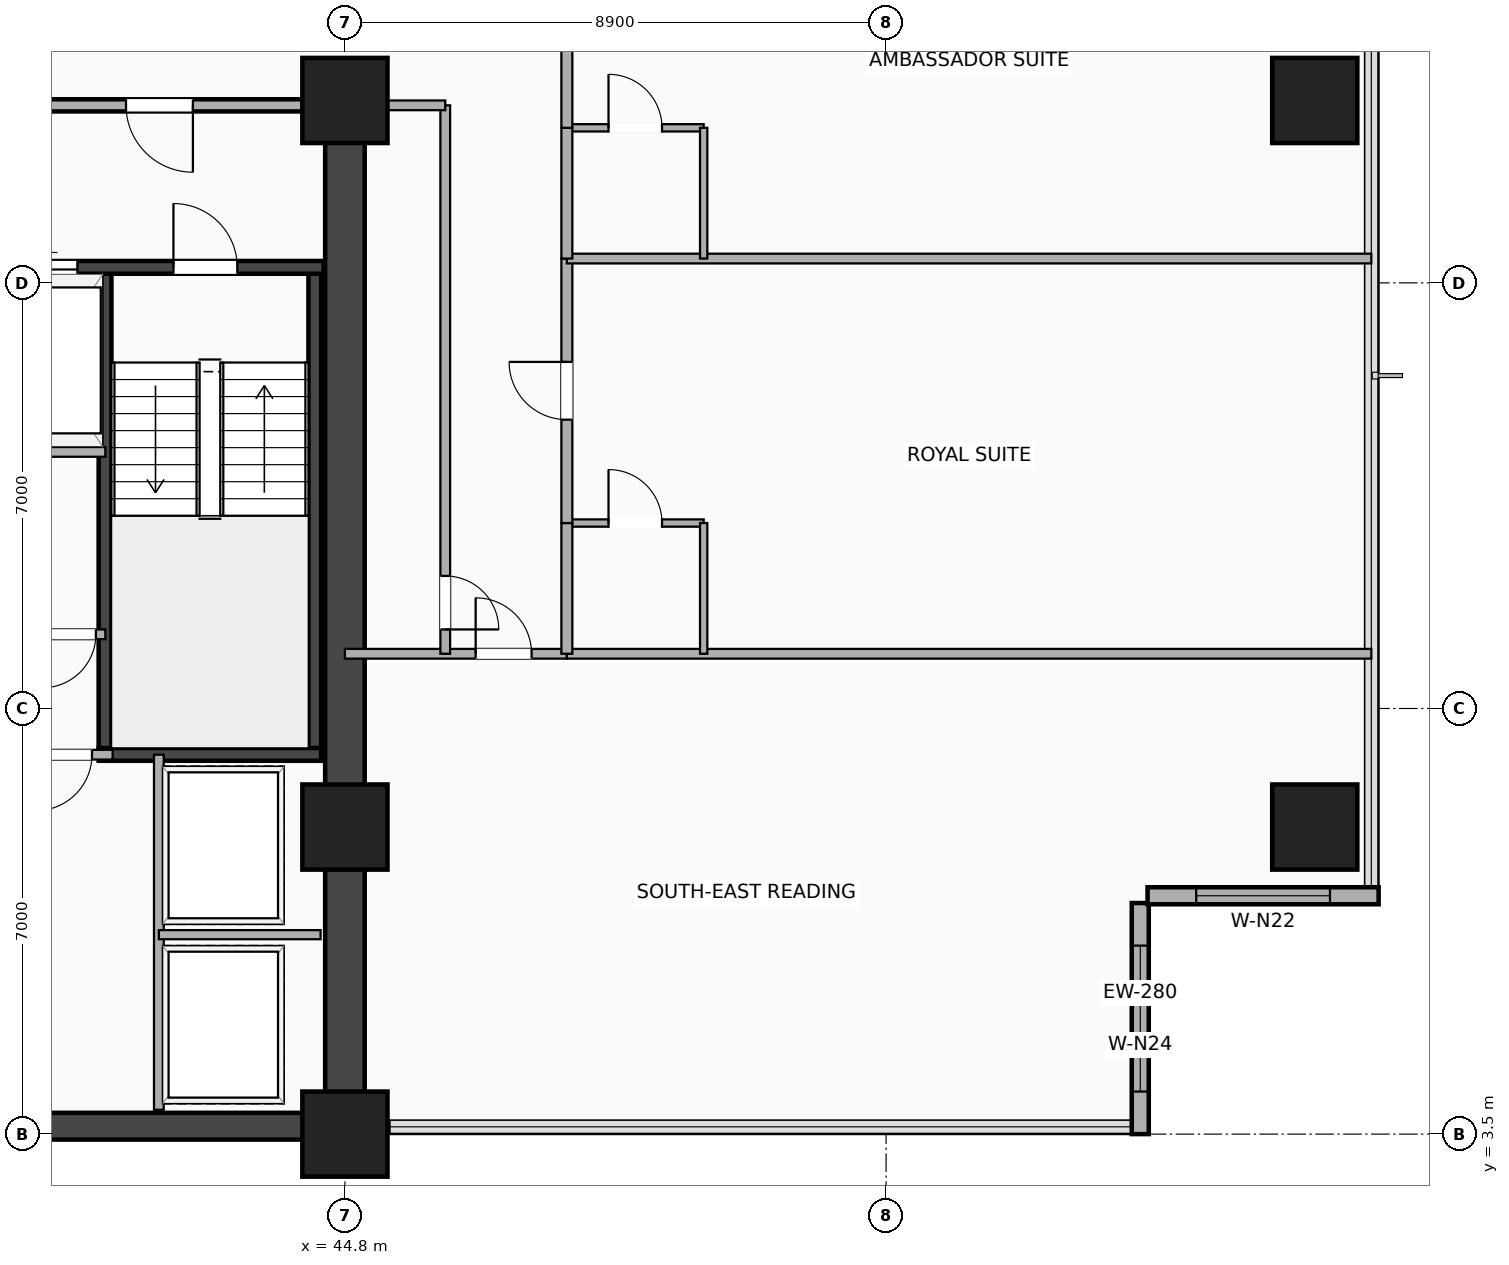
"""IFC4 building model, lengths in metres.
Left out: names, types, materials, properties, quantities, classifications, styles, units other than length and angle.
Written with IfcOpenShell. Run it as: python <this file> out.ifc"""

import sys

from ifc_helpers import new_model, si_unit, direction, frame, frame_2d, origin, origin_2d, place, context, subcontext, project, spatial, rectangle, extrude, element, fill, save


model = new_model("IFC4")
c1 = context("Model", 3, precision=1e-05, world=origin(), true_north=direction((0.0, 1.0)))
c2 = subcontext(c1, "Body", "Model", "MODEL_VIEW")
j1 = project(units=[si_unit("LENGTHUNIT", "METRE"), si_unit("PLANEANGLEUNIT", "RADIAN")], contexts=[c1])
p1 = place(None, origin())
s1 = spatial("IfcSite", under=j1, at=p1, CompositionType="ELEMENT")
p2 = place(p1, origin())
s2 = spatial("IfcBuilding", under=s1, at=p2, CompositionType="ELEMENT")
p3 = place(p2, frame((0.0, 0.0, 50.9)))
s3 = spatial("IfcBuildingStorey", under=s2, at=p3, CompositionType="ELEMENT", Elevation=50.9)
p4 = place(p3, frame((20.3, 3.63, 0.0), z_axis=(0.0, 0.0, 1.0), x_axis=(1.0, 0.0, 0.0)))
e1 = element("IfcWall", 1, at=p4, inside=s3, PredefinedType="SHEAR", context=c2, shape_type="SweptSolid", body=[
    extrude(rectangle(XDim=24.5, YDim=0.44, at=frame_2d((12.25, 0.0))), origin(), (0.0, 0.0, 1.0), 3.22),
])
p5 = place(p3, frame((44.8, 3.5, 0.0), z_axis=(0.0, 0.0, 1.0), x_axis=(0.0, 1.0, 0.0)))
e2 = element("IfcWall", 2, at=p5, inside=s3, PredefinedType="SHEAR", context=c2, shape_type="SweptSolid", body=[
    extrude(rectangle(XDim=16.9, YDim=0.65, at=frame_2d((8.45, 0.0))), origin(), (0.0, 0.0, 1.0), 3.22),
])
for number, where, z_axis, x_axis in (
    (3, (40.855, 9.745, 0.0), (0.0, 0.0, 1.0), (0.0, 1.0, 0.0)),
    (4, (44.305, 9.745, 0.0), (0.0, 0.0, 1.0), (0.0, 1.0, 0.0)),
):
    element("IfcWall", number, at=place(p3, frame(where, z_axis=z_axis, x_axis=x_axis)), inside=s3, PredefinedType="SHEAR", context=c2, shape_type="SweptSolid", body=[
        extrude(rectangle(XDim=8.01, YDim=0.21, at=frame_2d((4.005, 0.0))), origin(), (0.0, 0.0, 1.0), 3.22),
    ])
p6 = place(p3, frame((40.75, 9.745, 0.0), z_axis=(0.0, 0.0, 1.0), x_axis=(1.0, 0.0, 0.0)))
e5 = element("IfcWall", 5, at=p6, inside=s3, PredefinedType="SHEAR", context=c2, shape_type="SweptSolid", body=[
    extrude(rectangle(XDim=3.66, YDim=0.21, at=frame_2d((1.83, 0.0))), origin(), (0.0, 0.0, 1.0), 3.22),
])
p7 = place(p3, frame((37.25, 17.755, 0.0), z_axis=(0.0, 0.0, 1.0), x_axis=(1.0, 0.0, 0.0)))
e6 = element("IfcWall", 6, at=p7, inside=s3, PredefinedType="SHEAR", context=c2, shape_type="SweptSolid", body=[
    extrude(rectangle(XDim=7.2, YDim=0.21, at=frame_2d((3.6, 0.0))), origin(), (0.0, 0.0, 1.0), 3.22),
])
p8 = place(p7, frame((0.25, 0.0, 0.0)))
e7 = element("IfcOpeningElement", 7, at=p8, cuts=e6, PredefinedType="OPENING", context=c2, shape_type="SweptSolid", body=[
    extrude(rectangle(XDim=1.12, YDim=2.2, at=frame_2d((0.56, 1.1))), frame((0.0, 0.115, 0.0), z_axis=(0.0, -1.0, 0.0), x_axis=(1.0, 0.0, 0.0)), (0.0, 0.0, 1.0), 0.23),
])
p9 = place(p7, frame((2.05, 0.0, 0.0)))
e8 = element("IfcOpeningElement", 8, at=p9, cuts=e6, PredefinedType="OPENING", context=c2, shape_type="SweptSolid", body=[
    extrude(rectangle(XDim=1.1, YDim=2.18, at=frame_2d((0.55, 1.09))), frame((0.0, 0.115, 0.0), z_axis=(0.0, -1.0, 0.0), x_axis=(1.0, 0.0, 0.0)), (0.0, 0.0, 1.0), 0.23),
])
p10 = place(p7, frame((5.78, 0.0, 0.0), z_axis=(0.0, 0.0, 1.0), x_axis=(-1.0, 0.0, 0.0)))
e9 = element("IfcOpeningElement", 9, at=p10, cuts=e6, PredefinedType="OPENING", context=c2, shape_type="SweptSolid", body=[
    extrude(rectangle(XDim=1.05, YDim=2.15, at=frame_2d((0.525, 1.075))), frame((0.0, 0.115, 0.0), z_axis=(0.0, -1.0, 0.0), x_axis=(1.0, 0.0, 0.0)), (0.0, 0.0, 1.0), 0.23),
])
for number, where, z_axis, x_axis in (
    (10, (44.8, 3.5, -0.28), (0.0, 0.0, 1.0), (1.0, 0.0, 0.0)),
    (11, (44.8, 8.55, -0.28), (0.0, 0.0, 1.0), (1.0, 0.0, 0.0)),
    (12, (44.8, 20.5, -0.28), (0.0, 0.0, 1.0), (1.0, 0.0, 0.0)),
    (13, (60.75, 8.55, -0.28), (0.0, 0.0, 1.0), (1.0, 0.0, 0.0)),
    (14, (60.75, 20.5, -0.28), (0.0, 0.0, 1.0), (1.0, 0.0, 0.0)),
):
    element("IfcColumn", number, at=place(p3, frame(where, z_axis=z_axis, x_axis=x_axis)), inside=s3, PredefinedType="COLUMN", context=c2, shape_type="SweptSolid", body=[
        extrude(rectangle(XDim=1.4, YDim=1.4, at=origin_2d()), origin(), (0.0, 0.0, 1.0), 3.5),
    ])
p11 = place(p3, frame((57.88, 3.5, 0.0), z_axis=(0.0, 0.0, 1.0), x_axis=(0.0, 1.0, 0.0)))
e15 = element("IfcWall", 15, at=p11, inside=s3, PredefinedType="SOLIDWALL", context=c2, shape_type="SweptSolid", body=[
    extrude(rectangle(XDim=3.8, YDim=0.28, at=frame_2d((1.9, 0.0))), origin(), (0.0, 0.0, 1.0), 3.22),
])
p12 = place(p11, frame((0.7, 0.0, 0.85)))
e16 = element("IfcOpeningElement", 16, at=p12, cuts=e15, PredefinedType="OPENING", context=c2, shape_type="SweptSolid", body=[
    extrude(rectangle(XDim=2.4, YDim=1.65, at=frame_2d((1.2, 0.825))), frame((0.0, 0.15, 0.0), z_axis=(0.0, -1.0, 0.0), x_axis=(1.0, 0.0, 0.0)), (0.0, 0.0, 1.0), 0.3),
])
p13 = place(p3, frame((58.0, 7.42, 0.0), z_axis=(0.0, 0.0, 1.0), x_axis=(1.0, 0.0, 0.0)))
e17 = element("IfcWall", 17, at=p13, inside=s3, PredefinedType="SOLIDWALL", context=c2, shape_type="SweptSolid", body=[
    extrude(rectangle(XDim=3.8, YDim=0.28, at=frame_2d((1.9, 0.0))), origin(), (0.0, 0.0, 1.0), 3.22),
])
p14 = place(p13, frame((0.8, 0.0, 0.85)))
e18 = element("IfcOpeningElement", 18, at=p14, cuts=e17, PredefinedType="OPENING", context=c2, shape_type="SweptSolid", body=[
    extrude(rectangle(XDim=2.2, YDim=1.65, at=frame_2d((1.1, 0.825))), frame((0.0, 0.15, 0.0), z_axis=(0.0, -1.0, 0.0), x_axis=(1.0, 0.0, 0.0)), (0.0, 0.0, 1.0), 0.3),
])
p15 = place(p3, frame((37.25, 14.72, 0.0), z_axis=(0.0, 0.0, 1.0), x_axis=(1.0, 0.0, 0.0)))
e19 = element("IfcWall", 19, at=p15, inside=s3, PredefinedType="PARTITIONING", context=c2, shape_type="SweptSolid", body=[
    extrude(rectangle(XDim=3.61, YDim=0.16, at=frame_2d((1.805, 0.0))), origin(), (0.0, 0.0, 1.0), 3.22),
])
p16 = place(p3, frame((37.0, 20.42, 0.0), z_axis=(0.0, 0.0, 1.0), x_axis=(1.0, 0.0, 0.0)))
e20 = element("IfcWall", 20, at=p16, inside=s3, PredefinedType="PARTITIONING", context=c2, shape_type="SweptSolid", body=[
    extrude(rectangle(XDim=7.45, YDim=0.2, at=frame_2d((3.725, 0.0))), origin(), (0.0, 0.0, 1.0), 2.51),
])
p17 = place(p16, frame((4.2, 0.0, 0.0)))
e21 = element("IfcOpeningElement", 21, at=p17, cuts=e20, PredefinedType="OPENING", context=c2, shape_type="SweptSolid", body=[
    extrude(rectangle(XDim=1.1, YDim=2.15, at=frame_2d((0.55, 1.075))), frame((0.0, 0.11, 0.0), z_axis=(0.0, -1.0, 0.0), x_axis=(1.0, 0.0, 0.0)), (0.0, 0.0, 1.0), 0.22),
])
p18 = place(p3, frame((39.669, 11.72, 0.0), z_axis=(0.0, 0.0, 1.0), x_axis=(1.0, 0.0, 0.0)))
e22 = element("IfcWall", 22, at=p18, inside=s3, PredefinedType="PARTITIONING", context=c2, shape_type="SweptSolid", body=[
    extrude(rectangle(XDim=1.191, YDim=0.16, at=frame_2d((0.596, 0.0))), origin(), (0.0, 0.0, 1.0), 3.22),
])
p19 = place(p18, frame((0.156, 0.0, 0.0)))
e23 = element("IfcOpeningElement", 23, at=p19, cuts=e22, PredefinedType="OPENING", context=c2, shape_type="SweptSolid", body=[
    extrude(rectangle(XDim=0.88, YDim=2.08, at=frame_2d((0.44, 1.04))), frame((0.0, 0.09, 0.0), z_axis=(0.0, -1.0, 0.0), x_axis=(1.0, 0.0, 0.0)), (0.0, 0.0, 1.0), 0.18),
])
p20 = place(p3, frame((41.74, 3.9, 0.0), z_axis=(0.0, 0.0, 1.0), x_axis=(0.0, 1.0, 0.0)))
e24 = element("IfcWall", 24, at=p20, inside=s3, PredefinedType="PARTITIONING", context=c2, shape_type="SweptSolid", body=[
    extrude(rectangle(XDim=5.84, YDim=0.16, at=frame_2d((2.92, 0.0))), origin(), (0.0, 0.0, 1.0), 3.22),
])
p21 = place(p3, frame((41.74, 6.78, 0.0), z_axis=(0.0, 0.0, 1.0), x_axis=(1.0, 0.0, 0.0)))
e25 = element("IfcWall", 25, at=p21, inside=s3, PredefinedType="PARTITIONING", context=c2, shape_type="SweptSolid", body=[
    extrude(rectangle(XDim=2.66, YDim=0.15, at=frame_2d((1.33, 0.0))), origin(), (0.0, 0.0, 1.0), 2.51),
])
p22 = place(p3, frame((39.42, 9.74, 0.0), z_axis=(0.0, 0.0, 1.0), x_axis=(1.0, 0.0, 0.0)))
e26 = element("IfcWall", 26, at=p22, inside=s3, PredefinedType="PARTITIONING", context=c2, shape_type="SweptSolid", body=[
    extrude(rectangle(XDim=1.56, YDim=0.16, at=frame_2d((0.78, 0.0))), origin(), (0.0, 0.0, 1.0), 3.22),
])
p23 = place(p22, frame((0.3, 0.0, 0.0)))
e27 = element("IfcOpeningElement", 27, at=p23, cuts=e26, PredefinedType="OPENING", context=c2, shape_type="SweptSolid", body=[
    extrude(rectangle(XDim=0.92, YDim=2.08, at=frame_2d((0.46, 1.04))), frame((0.0, 0.09, 0.0), z_axis=(0.0, -1.0, 0.0), x_axis=(1.0, 0.0, 0.0)), (0.0, 0.0, 1.0), 0.18),
])
p24 = place(p3, frame((44.8, 11.4, 0.0), z_axis=(0.0, 0.0, 1.0), x_axis=(1.0, 0.0, 0.0)))
e28 = element("IfcWall", 28, at=p24, inside=s3, PredefinedType="PARTITIONING", context=c2, shape_type="SweptSolid", body=[
    extrude(rectangle(XDim=3.65, YDim=0.16, at=frame_2d((1.825, 0.0))), origin(), (0.0, 0.0, 1.0), 2.51),
])
p25 = place(p24, frame((3.07, 0.0, 0.0), z_axis=(0.0, 0.0, 1.0), x_axis=(-1.0, 0.0, 0.0)))
e29 = element("IfcOpeningElement", 29, at=p25, cuts=e28, PredefinedType="OPENING", context=c2, shape_type="SweptSolid", body=[
    extrude(rectangle(XDim=0.92, YDim=2.08, at=frame_2d((0.46, 1.04))), frame((0.0, 0.09, 0.0), z_axis=(0.0, -1.0, 0.0), x_axis=(1.0, 0.0, 0.0)), (0.0, 0.0, 1.0), 0.18),
])
p26 = place(p3, frame((46.45, 11.4, 0.0), z_axis=(0.0, 0.0, 1.0), x_axis=(0.0, 1.0, 0.0)))
e30 = element("IfcWall", 30, at=p26, inside=s3, PredefinedType="PARTITIONING", context=c2, shape_type="SweptSolid", body=[
    extrude(rectangle(XDim=9.02, YDim=0.16, at=frame_2d((4.51, 0.0))), origin(), (0.0, 0.0, 1.0), 2.51),
])
p27 = place(p26, frame((0.4, 0.0, 0.0)))
e31 = element("IfcOpeningElement", 31, at=p27, cuts=e30, PredefinedType="OPENING", context=c2, shape_type="SweptSolid", body=[
    extrude(rectangle(XDim=0.88, YDim=2.08, at=frame_2d((0.44, 1.04))), frame((0.0, 0.09, 0.0), z_axis=(0.0, -1.0, 0.0), x_axis=(1.0, 0.0, 0.0)), (0.0, 0.0, 1.0), 0.18),
])
p28 = place(p3, frame((44.8, 20.42, 0.0), z_axis=(0.0, 0.0, 1.0), x_axis=(1.0, 0.0, 0.0)))
e32 = element("IfcWall", 32, at=p28, inside=s3, PredefinedType="PARTITIONING", context=c2, shape_type="SweptSolid", body=[
    extrude(rectangle(XDim=1.65, YDim=0.16, at=frame_2d((0.825, 0.0))), origin(), (0.0, 0.0, 1.0), 2.51),
])
p29 = place(p3, frame((48.45, 11.4, 0.0), z_axis=(0.0, 0.0, 1.0), x_axis=(1.0, 0.0, 0.0)))
e33 = element("IfcWall", 33, at=p29, inside=s3, PredefinedType="PARTITIONING", context=c2, shape_type="SweptSolid", body=[
    extrude(rectangle(XDim=13.23, YDim=0.16, at=frame_2d((6.615, 0.0))), origin(), (0.0, 0.0, 1.0), 2.583),
])
p30 = place(p3, frame((48.45, 13.55, 0.0), z_axis=(0.0, 0.0, 1.0), x_axis=(1.0, 0.0, 0.0)))
e34 = element("IfcWall", 34, at=p30, inside=s3, PredefinedType="PARTITIONING", context=c2, shape_type="SweptSolid", body=[
    extrude(rectangle(XDim=2.25, YDim=0.12, at=frame_2d((1.125, 0.0))), origin(), (0.0, 0.0, 1.0), 3.22),
])
p31 = place(p30, frame((1.565, 0.0, 0.0), z_axis=(0.0, 0.0, 1.0), x_axis=(-1.0, 0.0, 0.0)))
e35 = element("IfcOpeningElement", 35, at=p31, cuts=e34, PredefinedType="OPENING", context=c2, shape_type="SweptSolid", body=[
    extrude(rectangle(XDim=0.88, YDim=2.08, at=frame_2d((0.44, 1.04))), frame((0.0, 0.07, 0.0), z_axis=(0.0, -1.0, 0.0), x_axis=(1.0, 0.0, 0.0)), (0.0, 0.0, 1.0), 0.14),
])
p32 = place(p3, frame((50.7, 11.4, 0.0), z_axis=(0.0, 0.0, 1.0), x_axis=(0.0, 1.0, 0.0)))
e36 = element("IfcWall", 36, at=p32, inside=s3, PredefinedType="PARTITIONING", context=c2, shape_type="SweptSolid", body=[
    extrude(rectangle(XDim=2.15, YDim=0.12, at=frame_2d((1.075, 0.0))), origin(), (0.0, 0.0, 1.0), 3.22),
])
p33 = place(p3, frame((48.45, 11.4, 0.0), z_axis=(0.0, 0.0, 1.0), x_axis=(0.0, 1.0, 0.0)))
e37 = element("IfcWall", 37, at=p33, inside=s3, PredefinedType="PARTITIONING", context=c2, shape_type="SweptSolid", body=[
    extrude(rectangle(XDim=2.15, YDim=0.18, at=frame_2d((1.075, 0.0))), origin(), (0.0, 0.0, 1.0), 3.22),
])
p34 = place(p3, frame((48.45, 13.55, 0.0), z_axis=(0.0, 0.0, 1.0), x_axis=(0.0, 1.0, 0.0)))
e38 = element("IfcWall", 38, at=p34, inside=s3, PredefinedType="PARTITIONING", context=c2, shape_type="SweptSolid", body=[
    extrude(rectangle(XDim=4.35, YDim=0.18, at=frame_2d((2.175, 0.0))), origin(), (0.0, 0.0, 1.0), 2.902),
])
p35 = place(p34, frame((2.65, 0.0, 0.0), z_axis=(0.0, 0.0, 1.0), x_axis=(-1.0, 0.0, 0.0)))
e39 = element("IfcOpeningElement", 39, at=p35, cuts=e38, PredefinedType="OPENING", context=c2, shape_type="SweptSolid", body=[
    extrude(rectangle(XDim=0.95, YDim=2.15, at=frame_2d((0.475, 1.075))), frame((0.0, 0.1, 0.0), z_axis=(0.0, -1.0, 0.0), x_axis=(1.0, 0.0, 0.0)), (0.0, 0.0, 1.0), 0.2),
])
p36 = place(p3, frame((48.45, 17.9, 0.0), z_axis=(0.0, 0.0, 1.0), x_axis=(1.0, 0.0, 0.0)))
e40 = element("IfcWall", 40, at=p36, inside=s3, PredefinedType="PARTITIONING", context=c2, shape_type="SweptSolid", body=[
    extrude(rectangle(XDim=13.23, YDim=0.16, at=frame_2d((6.615, 0.0))), origin(), (0.0, 0.0, 1.0), 2.583),
])
p37 = place(p3, frame((48.45, 20.05, 0.0), z_axis=(0.0, 0.0, 1.0), x_axis=(1.0, 0.0, 0.0)))
e41 = element("IfcWall", 41, at=p37, inside=s3, PredefinedType="PARTITIONING", context=c2, shape_type="SweptSolid", body=[
    extrude(rectangle(XDim=2.25, YDim=0.12, at=frame_2d((1.125, 0.0))), origin(), (0.0, 0.0, 1.0), 3.22),
])
p38 = place(p37, frame((1.565, 0.0, 0.0), z_axis=(0.0, 0.0, 1.0), x_axis=(-1.0, 0.0, 0.0)))
e42 = element("IfcOpeningElement", 42, at=p38, cuts=e41, PredefinedType="OPENING", context=c2, shape_type="SweptSolid", body=[
    extrude(rectangle(XDim=0.88, YDim=2.08, at=frame_2d((0.44, 1.04))), frame((0.0, 0.07, 0.0), z_axis=(0.0, -1.0, 0.0), x_axis=(1.0, 0.0, 0.0)), (0.0, 0.0, 1.0), 0.14),
])
p39 = place(p3, frame((50.7, 17.9, 0.0), z_axis=(0.0, 0.0, 1.0), x_axis=(0.0, 1.0, 0.0)))
e43 = element("IfcWall", 43, at=p39, inside=s3, PredefinedType="PARTITIONING", context=c2, shape_type="SweptSolid", body=[
    extrude(rectangle(XDim=2.15, YDim=0.12, at=frame_2d((1.075, 0.0))), origin(), (0.0, 0.0, 1.0), 3.22),
])
p40 = place(p3, frame((48.45, 17.9, 0.0), z_axis=(0.0, 0.0, 1.0), x_axis=(0.0, 1.0, 0.0)))
e44 = element("IfcWall", 44, at=p40, inside=s3, PredefinedType="PARTITIONING", context=c2, shape_type="SweptSolid", body=[
    extrude(rectangle(XDim=2.15, YDim=0.18, at=frame_2d((1.075, 0.0))), origin(), (0.0, 0.0, 1.0), 3.22),
])
p41 = place(p3, frame((48.45, 20.05, 0.0), z_axis=(0.0, 0.0, 1.0), x_axis=(0.0, 1.0, 0.0)))
e45 = element("IfcWall", 45, at=p41, inside=s3, PredefinedType="PARTITIONING", context=c2, shape_type="SweptSolid", body=[
    extrude(rectangle(XDim=4.35, YDim=0.18, at=frame_2d((2.175, 0.0))), origin(), (0.0, 0.0, 1.0), 2.51),
])
p42 = place(p41, frame((4.011, 0.0, 0.0), z_axis=(0.0, 0.0, 1.0), x_axis=(-1.0, 0.0, 0.0)))
e46 = element("IfcOpeningElement", 46, at=p42, cuts=e45, PredefinedType="OPENING", context=c2, shape_type="SweptSolid", body=[
    extrude(rectangle(XDim=0.95, YDim=2.15, at=frame_2d((0.475, 1.075))), frame((0.0, 0.1, 0.0), z_axis=(0.0, -1.0, 0.0), x_axis=(1.0, 0.0, 0.0)), (0.0, 0.0, 1.0), 0.2),
])
p43 = place(p12, origin())
e47 = element("IfcWindow", 47, at=p43, inside=s3, PartitioningType="SINGLE_PANEL", PredefinedType="WINDOW", context=c2, shape_type="SweptSolid", body=[
    extrude(rectangle(XDim=2.4, YDim=1.65, at=frame_2d((1.2, 0.825))), frame((0.0, 0.03, 0.0), z_axis=(0.0, -1.0, 0.0), x_axis=(1.0, 0.0, 0.0)), (0.0, 0.0, 1.0), 0.06),
])
fill(e16, e47)
p44 = place(p14, origin())
e48 = element("IfcWindow", 48, at=p44, inside=s3, PartitioningType="SINGLE_PANEL", PredefinedType="WINDOW", context=c2, shape_type="SweptSolid", body=[
    extrude(rectangle(XDim=2.2, YDim=1.65, at=frame_2d((1.1, 0.825))), frame((0.0, 0.03, 0.0), z_axis=(0.0, -1.0, 0.0), x_axis=(1.0, 0.0, 0.0)), (0.0, 0.0, 1.0), 0.06),
])
fill(e18, e48)
p45 = place(p9, origin())
e49 = element("IfcDoor", 49, at=p45, inside=s3, OperationType="DOUBLE_DOOR_SLIDING", PredefinedType="DOOR", context=c2, shape_type="SweptSolid", body=[
    extrude(rectangle(XDim=1.1, YDim=2.18, at=frame_2d((0.55, 1.09))), frame((0.0, 0.025, 0.0), z_axis=(0.0, -1.0, 0.0), x_axis=(1.0, 0.0, 0.0)), (0.0, 0.0, 1.0), 0.05),
])
fill(e8, e49)
p46 = place(p10, origin())
e50 = element("IfcDoor", 50, at=p46, inside=s3, OperationType="SINGLE_SWING_LEFT", PredefinedType="DOOR", context=c2, shape_type="SweptSolid", body=[
    extrude(rectangle(XDim=1.05, YDim=2.15, at=frame_2d((0.525, 1.075))), frame((0.0, 0.025, 0.0), z_axis=(0.0, -1.0, 0.0), x_axis=(1.0, 0.0, 0.0)), (0.0, 0.0, 1.0), 0.05),
])
fill(e9, e50)
p47 = place(p17, origin())
e51 = element("IfcDoor", 51, at=p47, inside=s3, OperationType="SINGLE_SWING_RIGHT", PredefinedType="DOOR", context=c2, shape_type="SweptSolid", body=[
    extrude(rectangle(XDim=1.1, YDim=2.15, at=frame_2d((0.55, 1.075))), frame((0.0, 0.025, 0.0), z_axis=(0.0, -1.0, 0.0), x_axis=(1.0, 0.0, 0.0)), (0.0, 0.0, 1.0), 0.05),
])
fill(e21, e51)
p48 = place(p19, origin())
e52 = element("IfcDoor", 52, at=p48, inside=s3, OperationType="SINGLE_SWING_LEFT", PredefinedType="DOOR", context=c2, shape_type="SweptSolid", body=[
    extrude(rectangle(XDim=0.88, YDim=2.08, at=frame_2d((0.44, 1.04))), frame((0.0, 0.025, 0.0), z_axis=(0.0, -1.0, 0.0), x_axis=(1.0, 0.0, 0.0)), (0.0, 0.0, 1.0), 0.05),
])
fill(e23, e52)
p49 = place(p23, origin())
e53 = element("IfcDoor", 53, at=p49, inside=s3, OperationType="SINGLE_SWING_LEFT", PredefinedType="DOOR", context=c2, shape_type="SweptSolid", body=[
    extrude(rectangle(XDim=0.92, YDim=2.08, at=frame_2d((0.46, 1.04))), frame((0.0, 0.025, 0.0), z_axis=(0.0, -1.0, 0.0), x_axis=(1.0, 0.0, 0.0)), (0.0, 0.0, 1.0), 0.05),
])
fill(e27, e53)
p50 = place(p25, origin())
e54 = element("IfcDoor", 54, at=p50, inside=s3, OperationType="SINGLE_SWING_LEFT", PredefinedType="DOOR", context=c2, shape_type="SweptSolid", body=[
    extrude(rectangle(XDim=0.92, YDim=2.08, at=frame_2d((0.46, 1.04))), frame((0.0, 0.025, 0.0), z_axis=(0.0, -1.0, 0.0), x_axis=(1.0, 0.0, 0.0)), (0.0, 0.0, 1.0), 0.05),
])
fill(e29, e54)
p51 = place(p27, origin())
e55 = element("IfcDoor", 55, at=p51, inside=s3, OperationType="SINGLE_SWING_LEFT", PredefinedType="DOOR", context=c2, shape_type="SweptSolid", body=[
    extrude(rectangle(XDim=0.88, YDim=2.08, at=frame_2d((0.44, 1.04))), frame((0.0, 0.025, 0.0), z_axis=(0.0, -1.0, 0.0), x_axis=(1.0, 0.0, 0.0)), (0.0, 0.0, 1.0), 0.05),
])
fill(e31, e55)
p52 = place(p31, origin())
e56 = element("IfcDoor", 56, at=p52, inside=s3, OperationType="SINGLE_SWING_LEFT", PredefinedType="DOOR", context=c2, shape_type="SweptSolid", body=[
    extrude(rectangle(XDim=0.88, YDim=2.08, at=frame_2d((0.44, 1.04))), frame((0.0, 0.025, 0.0), z_axis=(0.0, -1.0, 0.0), x_axis=(1.0, 0.0, 0.0)), (0.0, 0.0, 1.0), 0.05),
])
fill(e35, e56)
p53 = place(p35, origin())
e57 = element("IfcDoor", 57, at=p53, inside=s3, OperationType="SINGLE_SWING_RIGHT", PredefinedType="DOOR", context=c2, shape_type="SweptSolid", body=[
    extrude(rectangle(XDim=0.95, YDim=2.15, at=frame_2d((0.475, 1.075))), frame((0.0, 0.025, 0.0), z_axis=(0.0, -1.0, 0.0), x_axis=(1.0, 0.0, 0.0)), (0.0, 0.0, 1.0), 0.05),
])
fill(e39, e57)
p54 = place(p38, origin())
e58 = element("IfcDoor", 58, at=p54, inside=s3, OperationType="SINGLE_SWING_LEFT", PredefinedType="DOOR", context=c2, shape_type="SweptSolid", body=[
    extrude(rectangle(XDim=0.88, YDim=2.08, at=frame_2d((0.44, 1.04))), frame((0.0, 0.025, 0.0), z_axis=(0.0, -1.0, 0.0), x_axis=(1.0, 0.0, 0.0)), (0.0, 0.0, 1.0), 0.05),
])
fill(e42, e58)
save(model, sys.argv[1])
